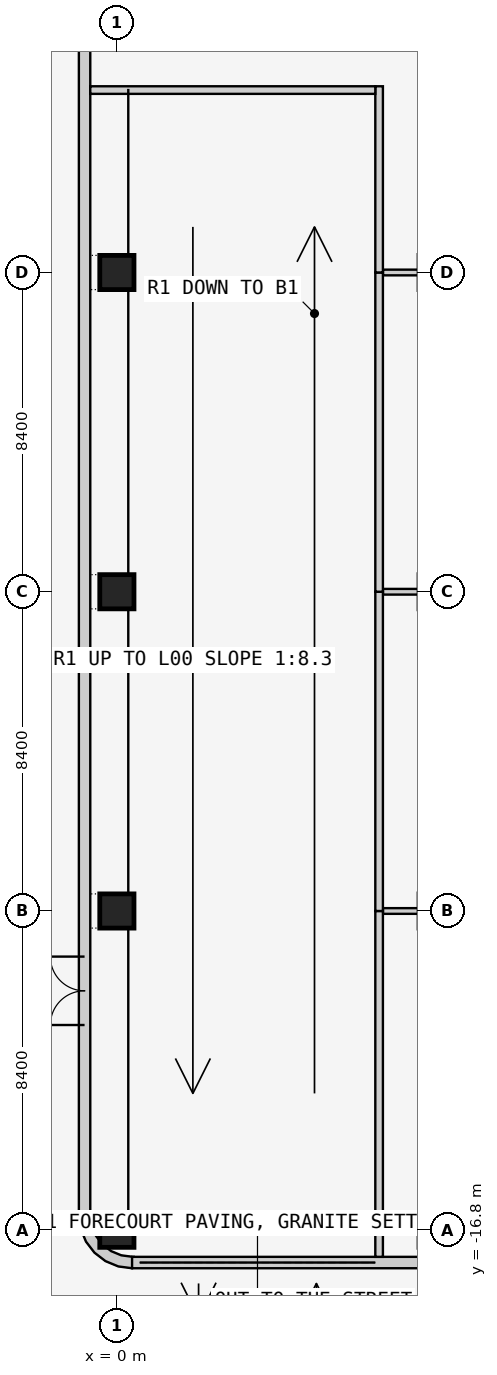
"""IFC4 building model, lengths in metres.
Left out: names, types, materials, properties, quantities, classifications, styles, units other than length and angle.
Written with IfcOpenShell. Run it as: python <this file> out.ifc"""

import sys

from ifc_helpers import new_model, si_unit, direction, frame, frame_2d, origin, origin_2d, place, context, subcontext, project, spatial, polyline, rectangle, outline, extrude, element, fill, save


model = new_model("IFC4")
c1 = context("Model", 3, precision=1e-05, world=origin(), true_north=direction((0.0, 1.0)))
c2 = subcontext(c1, "Body", "Model", "MODEL_VIEW")
j1 = project(units=[si_unit("LENGTHUNIT", "METRE"), si_unit("PLANEANGLEUNIT", "RADIAN")], contexts=[c1])
p1 = place(None, origin())
s1 = spatial("IfcSite", under=j1, at=p1, CompositionType="ELEMENT")
p2 = place(p1, origin())
s2 = spatial("IfcBuilding", under=s1, at=p2, CompositionType="ELEMENT")
p3 = place(p2, origin())
s3 = spatial("IfcBuildingStorey", under=s2, at=p3, CompositionType="ELEMENT", Elevation=0.0)
for number, where, z_axis, x_axis in (
    (1, (0.0, -16.8, 0.0), (0.0, 0.0, 1.0), (1.0, 0.0, 0.0)),
    (2, (0.0, -8.4, 0.0), (0.0, 0.0, 1.0), (1.0, 0.0, 0.0)),
    (3, (0.0, 0.0, 0.0), (0.0, 0.0, 1.0), (1.0, 0.0, 0.0)),
    (4, (0.0, 8.4, 0.0), (0.0, 0.0, 1.0), (1.0, 0.0, 0.0)),
):
    element("IfcColumn", number, at=place(p3, frame(where, z_axis=z_axis, x_axis=x_axis)), inside=s3, PredefinedType="COLUMN", context=c2, shape_type="SweptSolid", body=[
        extrude(rectangle(XDim=0.9, YDim=0.9, at=origin_2d()), origin(), (0.0, 0.0, 1.0), 6.0),
    ])
p4 = place(p3, frame((-0.85, 58.4, 0.0), z_axis=(0.0, 0.0, 1.0), x_axis=(0.0, -1.0, 0.0)))
e5 = element("IfcWall", 5, at=p4, inside=s3, PredefinedType="SOLIDWALL", context=c2, shape_type="SweptSolid", body=[
    extrude(rectangle(XDim=74.8, YDim=0.3, at=frame_2d((37.4, 0.0))), origin(), (0.0, 0.0, 1.0), 5.8),
])
p5 = place(p4, frame((68.0, 0.0, 0.0)))
e6 = element("IfcOpeningElement", 6, at=p5, cuts=e5, PredefinedType="OPENING", context=c2, shape_type="SweptSolid", body=[
    extrude(rectangle(XDim=1.8, YDim=2.4, at=frame_2d((0.9, 1.2))), frame((0.0, 0.16, 0.0), z_axis=(0.0, -1.0, 0.0), x_axis=(1.0, 0.0, 0.0)), (0.0, 0.0, 1.0), 0.32),
])
p6 = place(p4, frame((37.0, 0.0, 0.0)))
e7 = element("IfcOpeningElement", 7, at=p6, cuts=e5, PredefinedType="OPENING", context=c2, shape_type="SweptSolid", body=[
    extrude(rectangle(XDim=1.8, YDim=2.4, at=frame_2d((0.9, 1.2))), frame((0.0, 0.16, 0.0), z_axis=(0.0, -1.0, 0.0), x_axis=(1.0, 0.0, 0.0)), (0.0, 0.0, 1.0), 0.32),
])
p7 = place(p4, frame((11.0, 0.0, 0.0)))
e8 = element("IfcOpeningElement", 8, at=p7, cuts=e5, PredefinedType="OPENING", context=c2, shape_type="SweptSolid", body=[
    extrude(rectangle(XDim=1.8, YDim=2.4, at=frame_2d((0.9, 1.2))), frame((0.0, 0.16, 0.0), z_axis=(0.0, -1.0, 0.0), x_axis=(1.0, 0.0, 0.0)), (0.0, 0.0, 1.0), 0.32),
])
p8 = place(p3, frame((0.4, -17.65, 0.0), z_axis=(0.0, 0.0, 1.0), x_axis=(1.0, 0.0, 0.0)))
e9 = element("IfcWall", 9, at=p8, inside=s3, PredefinedType="SOLIDWALL", context=c2, shape_type="SweptSolid", body=[
    extrude(rectangle(XDim=8.6, YDim=0.3, at=frame_2d((4.3, 0.0))), origin(), (0.0, 0.0, 1.0), 5.8),
])
p9 = place(p8, frame((0.2, 0.0, 0.0)))
e10 = element("IfcOpeningElement", 10, at=p9, cuts=e9, PredefinedType="OPENING", context=c2, shape_type="SweptSolid", body=[
    extrude(rectangle(XDim=6.2, YDim=2.7, at=frame_2d((3.1, 1.35))), frame((0.0, 0.16, 0.0), z_axis=(0.0, -1.0, 0.0), x_axis=(1.0, 0.0, 0.0)), (0.0, 0.0, 1.0), 0.32),
])
p10 = place(p3, frame((-0.848, -16.355, 0.0), z_axis=(0.0, 0.0, 1.0), x_axis=(-0.707106781187, -0.707106781187, 0.0)))
e11 = element("IfcWall", 11, at=p10, inside=s3, PredefinedType="SOLIDWALL", context=c2, shape_type="SweptSolid", body=[
    extrude(outline(polyline([(0.139, 1.904), (-0.101, 1.72), (-0.087, 1.706), (0.1, 1.463), (0.209, 1.198), (0.247, 0.914), (0.209, 0.63), (0.1, 0.365), (-0.087, 0.122), (-0.101, 0.108), (0.139, -0.076), (0.362, 0.214), (0.502, 0.552), (0.549, 0.914), (0.502, 1.276), (0.362, 1.614), (0.139, 1.904)])), origin(), (0.0, 0.0, 1.0), 5.8),
])
p11 = place(p3, frame((7.0, -8.4, 0.0), z_axis=(0.0, 0.0, 1.0), x_axis=(1.0, 0.0, 0.0)))
e12 = element("IfcWall", 12, at=p11, inside=s3, PredefinedType="PARTITIONING", context=c2, shape_type="SweptSolid", body=[
    extrude(rectangle(XDim=0.95, YDim=0.15, at=frame_2d((0.475, 0.0))), origin(), (0.0, 0.0, 1.0), 5.043),
])
p12 = place(p3, frame((6.9, -17.5, 0.0), z_axis=(0.0, 0.0, 1.0), x_axis=(0.0, 1.0, 0.0)))
e13 = element("IfcWall", 13, at=p12, inside=s3, PredefinedType="PARTITIONING", context=c2, shape_type="SweptSolid", body=[
    extrude(rectangle(XDim=9.1, YDim=0.2, at=frame_2d((4.55, 0.0))), origin(), (0.0, 0.0, 1.0), 5.8),
])
p13 = place(p3, frame((7.0, 0.0, 0.0), z_axis=(0.0, 0.0, 1.0), x_axis=(1.0, 0.0, 0.0)))
e14 = element("IfcWall", 14, at=p13, inside=s3, PredefinedType="PARTITIONING", context=c2, shape_type="SweptSolid", body=[
    extrude(rectangle(XDim=0.95, YDim=0.15, at=frame_2d((0.475, 0.0))), origin(), (0.0, 0.0, 1.0), 5.043),
])
p14 = place(p3, frame((6.9, -8.4, 0.0), z_axis=(0.0, 0.0, 1.0), x_axis=(0.0, 1.0, 0.0)))
e15 = element("IfcWall", 15, at=p14, inside=s3, PredefinedType="PARTITIONING", context=c2, shape_type="SweptSolid", body=[
    extrude(rectangle(XDim=8.4, YDim=0.2, at=frame_2d((4.2, 0.0))), origin(), (0.0, 0.0, 1.0), 5.8),
])
p15 = place(p3, frame((7.0, 8.4, 0.0), z_axis=(0.0, 0.0, 1.0), x_axis=(1.0, 0.0, 0.0)))
e16 = element("IfcWall", 16, at=p15, inside=s3, PredefinedType="PARTITIONING", context=c2, shape_type="SweptSolid", body=[
    extrude(rectangle(XDim=0.95, YDim=0.15, at=frame_2d((0.475, 0.0))), origin(), (0.0, 0.0, 1.0), 5.043),
])
p16 = place(p3, frame((6.9, 0.0, 0.0), z_axis=(0.0, 0.0, 1.0), x_axis=(0.0, 1.0, 0.0)))
e17 = element("IfcWall", 17, at=p16, inside=s3, PredefinedType="PARTITIONING", context=c2, shape_type="SweptSolid", body=[
    extrude(rectangle(XDim=8.4, YDim=0.2, at=frame_2d((4.2, 0.0))), origin(), (0.0, 0.0, 1.0), 5.8),
])
p17 = place(p3, frame((6.9, 8.4, 0.0), z_axis=(0.0, 0.0, 1.0), x_axis=(0.0, 1.0, 0.0)))
e18 = element("IfcWall", 18, at=p17, inside=s3, PredefinedType="PARTITIONING", context=c2, shape_type="SweptSolid", body=[
    extrude(rectangle(XDim=4.9, YDim=0.2, at=frame_2d((2.45, 0.0))), origin(), (0.0, 0.0, 1.0), 5.8),
])
p18 = place(p3, frame((6.8, 13.2, 0.0), z_axis=(0.0, 0.0, 1.0), x_axis=(-1.0, 0.0, 0.0)))
e19 = element("IfcWall", 19, at=p18, inside=s3, PredefinedType="PARTITIONING", context=c2, shape_type="SweptSolid", body=[
    extrude(rectangle(XDim=7.5, YDim=0.2, at=frame_2d((3.75, 0.0))), origin(), (0.0, 0.0, 1.0), 5.8),
])
p19 = place(p5, frame((1.8, 0.0, 0.0), z_axis=(0.0, 0.0, 1.0), x_axis=(-1.0, 0.0, 0.0)))
e20 = element("IfcDoor", 20, at=p19, inside=s3, OperationType="DOUBLE_DOOR_SINGLE_SWING", PredefinedType="DOOR", context=c2, shape_type="SweptSolid", body=[
    extrude(rectangle(XDim=1.8, YDim=2.4, at=frame_2d((0.9, 1.2))), frame((0.0, 0.025, 0.0), z_axis=(0.0, -1.0, 0.0), x_axis=(1.0, 0.0, 0.0)), (0.0, 0.0, 1.0), 0.05),
])
fill(e6, e20)
p20 = place(p9, origin())
e21 = element("IfcDoor", 21, at=p20, inside=s3, OperationType="ROLLINGUP", PredefinedType="GATE", context=c2, shape_type="SweptSolid", body=[
    extrude(rectangle(XDim=6.2, YDim=2.7, at=frame_2d((3.1, 1.35))), frame((0.0, 0.025, 0.0), z_axis=(0.0, -1.0, 0.0), x_axis=(1.0, 0.0, 0.0)), (0.0, 0.0, 1.0), 0.05),
])
fill(e10, e21)
save(model, sys.argv[1])
